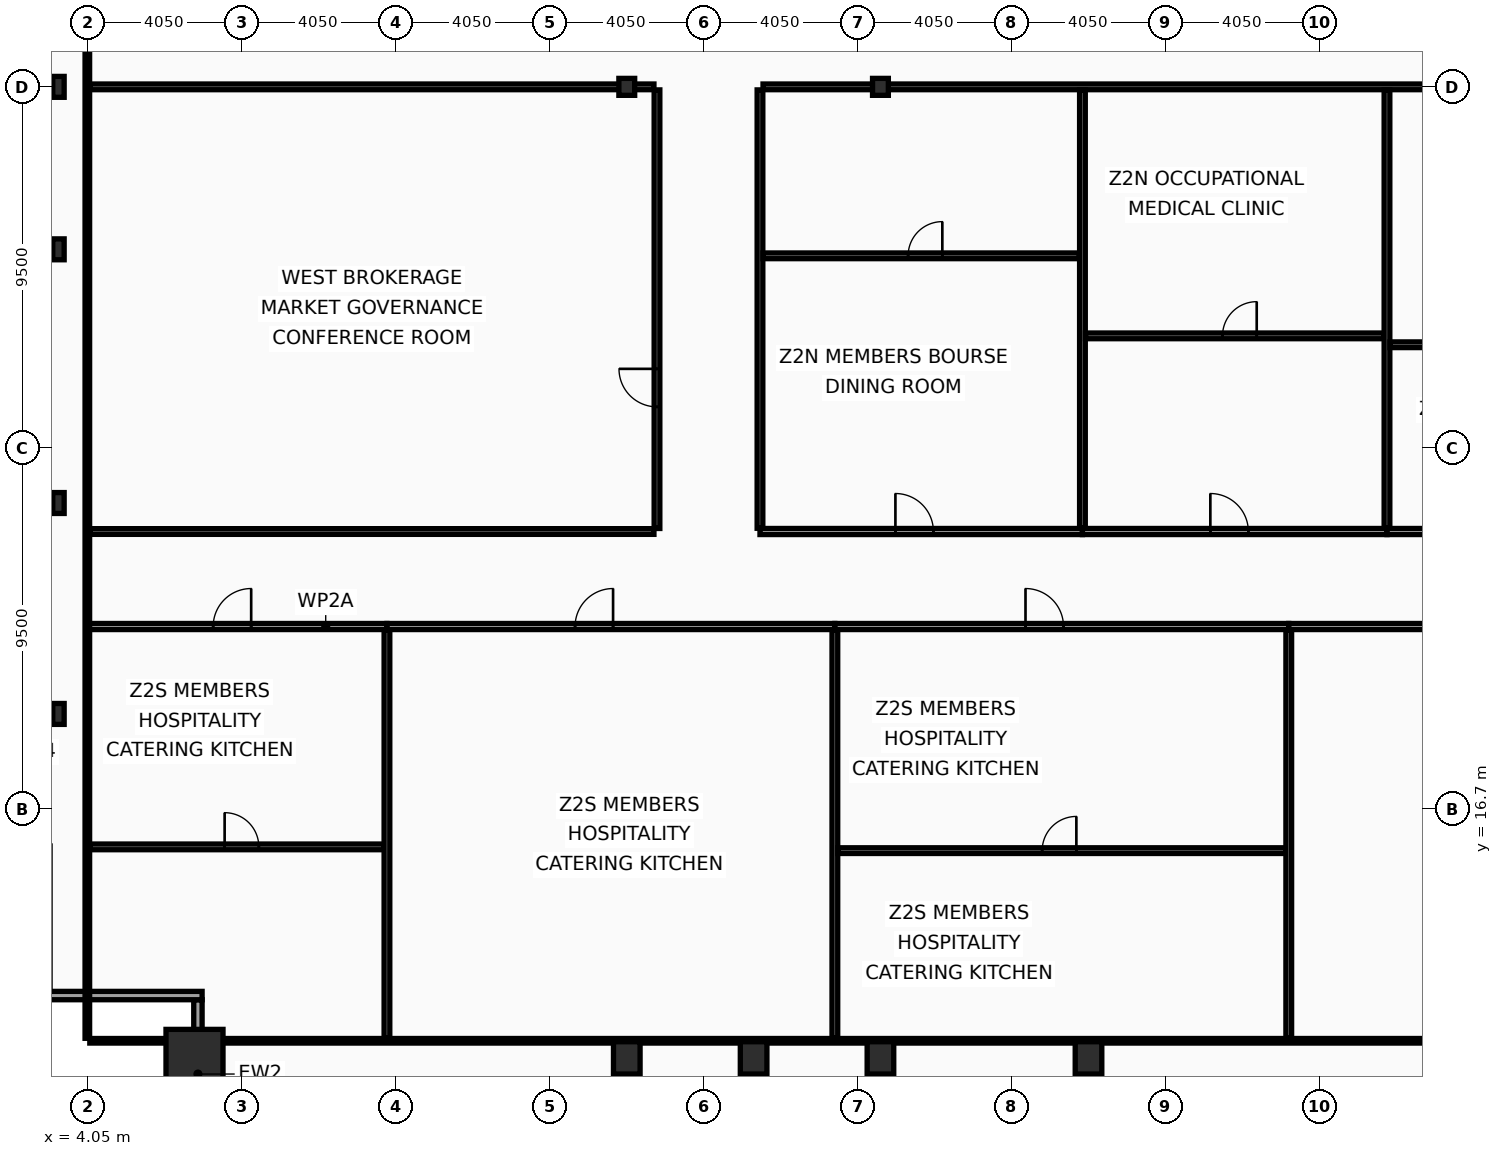
"""IFC4 building model, lengths in metres.
Left out: names, types, materials, properties, quantities, classifications, styles, units other than length and angle.
Written with IfcOpenShell. Run it as: python <this file> out.ifc"""

import sys

from ifc_helpers import new_model, si_unit, direction, frame, frame_2d, origin, origin_2d, place, context, subcontext, project, spatial, rectangle, hollow_rectangle, i_section, extrude, element, fill, save


model = new_model("IFC4")
c1 = context("Model", 3, precision=1e-05, world=origin(), true_north=direction((0.0, 1.0)))
c2 = subcontext(c1, "Body", "Model", "MODEL_VIEW")
j1 = project(units=[si_unit("LENGTHUNIT", "METRE"), si_unit("PLANEANGLEUNIT", "RADIAN")], contexts=[c1])
p1 = place(None, origin())
s1 = spatial("IfcSite", under=j1, at=p1, CompositionType="ELEMENT")
p2 = place(p1, origin())
s2 = spatial("IfcBuilding", under=s1, at=p2, CompositionType="ELEMENT")
p3 = place(p2, frame((0.0, 0.0, 125.4)))
s3 = spatial("IfcBuildingStorey", under=s2, at=p3, CompositionType="ELEMENT", Elevation=125.4)
p4 = place(p3, frame((6.85, 10.15, 0.0), z_axis=(0.0, 0.0, 1.0), x_axis=(1.0, 0.0, 0.0)))
e1 = element("IfcColumn", 1, at=p4, inside=s3, PredefinedType="COLUMN", context=c2, shape_type="SweptSolid", body=[
    extrude(hollow_rectangle(XDim=1.5, YDim=1.5, WallThickness=0.07, at=origin_2d()), origin(), (0.0, 0.0, 1.0), 3.6),
])
for number, where, z_axis, x_axis in (
    (2, (18.225, 10.15, 0.0), (0.0, 0.0, 1.0), (1.0, 0.0, 0.0)),
    (3, (21.562, 10.15, 0.0), (0.0, 0.0, 1.0), (1.0, 0.0, 0.0)),
    (4, (24.9, 10.15, 0.0), (0.0, 0.0, 1.0), (1.0, 0.0, 0.0)),
    (5, (30.375, 10.15, 0.0), (0.0, 0.0, 1.0), (1.0, 0.0, 0.0)),
):
    element("IfcColumn", number, at=place(p3, frame(where, z_axis=z_axis, x_axis=x_axis)), inside=s3, PredefinedType="COLUMN", context=c2, shape_type="SweptSolid", body=[
        extrude(hollow_rectangle(XDim=0.7, YDim=0.85, WallThickness=0.05, at=origin_2d()), origin(), (0.0, 0.0, 1.0), 3.6),
    ])
for number, where, z_axis, x_axis in (
    (6, (3.27, 19.2, 0.0), (0.0, 0.0, 1.0), (1.0, 0.0, 0.0)),
    (7, (3.27, 24.75, 0.0), (0.0, 0.0, 1.0), (1.0, 0.0, 0.0)),
    (8, (3.27, 31.425, 0.0), (0.0, 0.0, 1.0), (1.0, 0.0, 0.0)),
    (9, (3.27, 35.7, 0.0), (0.0, 0.0, 1.0), (1.0, 0.0, 0.0)),
):
    element("IfcColumn", number, at=place(p3, frame(where, z_axis=z_axis, x_axis=x_axis)), inside=s3, PredefinedType="COLUMN", context=c2, shape_type="SweptSolid", body=[
        extrude(i_section(OverallWidth=0.3, OverallDepth=0.55, WebThickness=0.015, FlangeThickness=0.029, at=origin_2d()), origin(), (0.0, 0.0, 1.0), 3.6),
    ])
for number, where, z_axis, x_axis in (
    (10, (18.225, 35.7, 0.0), (0.0, 0.0, 1.0), (1.0, 0.0, 0.0)),
    (11, (24.9, 35.7, 0.0), (0.0, 0.0, 1.0), (1.0, 0.0, 0.0)),
):
    element("IfcColumn", number, at=place(p3, frame(where, z_axis=z_axis, x_axis=x_axis)), inside=s3, PredefinedType="COLUMN", context=c2, shape_type="SweptSolid", body=[
        extrude(i_section(OverallWidth=0.416, OverallDepth=0.446, WebThickness=0.039, FlangeThickness=0.063, at=origin_2d()), origin(), (0.0, 0.0, 1.0), 3.6),
    ])
p5 = place(p3, frame((6.94, 7.77, 0.0), z_axis=(0.0, 0.0, 1.0), x_axis=(0.0, 1.0, 0.0)))
e12 = element("IfcWall", 12, at=p5, inside=s3, PredefinedType="SOLIDWALL", context=c2, shape_type="SweptSolid", body=[
    extrude(rectangle(XDim=3.91, YDim=0.22, at=frame_2d((1.955, 0.0))), origin(), (0.0, 0.0, 1.0), 2.83),
])
p6 = place(p3, frame((7.05, 11.79, 0.0), z_axis=(0.0, 0.0, 1.0), x_axis=(-1.0, 0.0, 0.0)))
e13 = element("IfcWall", 13, at=p6, inside=s3, PredefinedType="SOLIDWALL", context=c2, shape_type="SweptSolid", body=[
    extrude(rectangle(XDim=4.22, YDim=0.22, at=frame_2d((2.11, 0.0))), origin(), (0.0, 0.0, 1.0), 2.83),
])
p7 = place(p3, frame((4.03, 21.5, 0.0), z_axis=(0.0, 0.0, 1.0), x_axis=(1.0, 0.0, 0.0)))
e14 = element("IfcWall", 14, at=p7, inside=s3, PredefinedType="PARTITIONING", context=c2, shape_type="SweptSolid", body=[
    extrude(rectangle(XDim=7.884, YDim=0.16, at=frame_2d((3.942, 0.0))), origin(), (0.0, 0.0, 1.0), 3.44),
])
p8 = place(p7, frame((3.311, 0.0, 0.0)))
e15 = element("IfcOpeningElement", 15, at=p8, cuts=e14, PredefinedType="OPENING", context=c2, shape_type="SweptSolid", body=[
    extrude(rectangle(XDim=1.0, YDim=2.05, at=frame_2d((0.5, 1.025))), frame((0.0, 0.09, 0.0), z_axis=(0.0, -1.0, 0.0), x_axis=(1.0, 0.0, 0.0)), (0.0, 0.0, 1.0), 0.18),
])
p9 = place(p3, frame((4.095, 15.702, 0.0), z_axis=(0.0, 0.0, 1.0), x_axis=(1.0, 0.0, 0.0)))
e16 = element("IfcWall", 16, at=p9, inside=s3, PredefinedType="PARTITIONING", context=c2, shape_type="SweptSolid", body=[
    extrude(rectangle(XDim=7.739, YDim=0.15, at=frame_2d((3.87, 0.0))), origin(), (0.0, 0.0, 1.0), 2.83),
])
p10 = place(p9, frame((3.548, 0.0, 0.0)))
e17 = element("IfcOpeningElement", 17, at=p10, cuts=e16, PredefinedType="OPENING", context=c2, shape_type="SweptSolid", body=[
    extrude(rectangle(XDim=0.9, YDim=2.05, at=frame_2d((0.45, 1.025))), frame((0.0, 0.085, 0.0), z_axis=(0.0, -1.0, 0.0), x_axis=(1.0, 0.0, 0.0)), (0.0, 0.0, 1.0), 0.17),
])
p11 = place(p3, frame((11.914, 21.5, 0.0), z_axis=(0.0, 0.0, 1.0), x_axis=(1.0, 0.0, 0.0)))
e18 = element("IfcWall", 18, at=p11, inside=s3, PredefinedType="PARTITIONING", context=c2, shape_type="SweptSolid", body=[
    extrude(rectangle(XDim=11.787, YDim=0.16, at=frame_2d((5.893, 0.0))), origin(), (0.0, 0.0, 1.0), 2.73),
])
p12 = place(p11, frame((4.95, 0.0, 0.0)))
e19 = element("IfcOpeningElement", 19, at=p12, cuts=e18, PredefinedType="OPENING", context=c2, shape_type="SweptSolid", body=[
    extrude(rectangle(XDim=1.0, YDim=2.05, at=frame_2d((0.5, 1.025))), frame((0.0, 0.09, 0.0), z_axis=(0.0, -1.0, 0.0), x_axis=(1.0, 0.0, 0.0)), (0.0, 0.0, 1.0), 0.18),
])
p13 = place(p3, frame((11.914, 10.665, 0.0), z_axis=(0.0, 0.0, 1.0), x_axis=(0.0, 1.0, 0.0)))
e20 = element("IfcWall", 20, at=p13, inside=s3, PredefinedType="PARTITIONING", context=c2, shape_type="SweptSolid", body=[
    extrude(rectangle(XDim=10.75, YDim=0.15, at=frame_2d((5.375, 0.0))), origin(), (0.0, 0.0, 1.0), 2.73),
])
p14 = place(p3, frame((23.701, 21.5, 0.0), z_axis=(0.0, 0.0, 1.0), x_axis=(1.0, 0.0, 0.0)))
e21 = element("IfcWall", 21, at=p14, inside=s3, PredefinedType="PARTITIONING", context=c2, shape_type="SweptSolid", body=[
    extrude(rectangle(XDim=11.944, YDim=0.16, at=frame_2d((5.972, 0.0))), origin(), (0.0, 0.0, 1.0), 2.73),
])
p15 = place(p14, frame((5.016, 0.0, 0.0)))
e22 = element("IfcOpeningElement", 22, at=p15, cuts=e21, PredefinedType="OPENING", context=c2, shape_type="SweptSolid", body=[
    extrude(rectangle(XDim=1.0, YDim=2.05, at=frame_2d((0.5, 1.025))), frame((0.0, 0.09, 0.0), z_axis=(0.0, -1.0, 0.0), x_axis=(1.0, 0.0, 0.0)), (0.0, 0.0, 1.0), 0.18),
])
p16 = place(p3, frame((23.701, 10.665, 0.0), z_axis=(0.0, 0.0, 1.0), x_axis=(0.0, 1.0, 0.0)))
e23 = element("IfcWall", 23, at=p16, inside=s3, PredefinedType="PARTITIONING", context=c2, shape_type="SweptSolid", body=[
    extrude(rectangle(XDim=10.75, YDim=0.15, at=frame_2d((5.375, 0.0))), origin(), (0.0, 0.0, 1.0), 2.88),
])
p17 = place(p3, frame((23.781, 15.603, 0.0), z_axis=(0.0, 0.0, 1.0), x_axis=(1.0, 0.0, 0.0)))
e24 = element("IfcWall", 24, at=p17, inside=s3, PredefinedType="PARTITIONING", context=c2, shape_type="SweptSolid", body=[
    extrude(rectangle(XDim=11.784, YDim=0.15, at=frame_2d((5.892, 0.0))), origin(), (0.0, 0.0, 1.0), 2.73),
])
p18 = place(p17, frame((5.375, 0.0, 0.0)))
e25 = element("IfcOpeningElement", 25, at=p18, cuts=e24, PredefinedType="OPENING", context=c2, shape_type="SweptSolid", body=[
    extrude(rectangle(XDim=0.9, YDim=2.05, at=frame_2d((0.45, 1.025))), frame((0.0, 0.085, 0.0), z_axis=(0.0, -1.0, 0.0), x_axis=(1.0, 0.0, 0.0)), (0.0, 0.0, 1.0), 0.17),
])
p19 = place(p3, frame((35.645, 21.5, 0.0), z_axis=(0.0, 0.0, 1.0), x_axis=(1.0, 0.0, 0.0)))
e26 = element("IfcWall", 26, at=p19, inside=s3, PredefinedType="PARTITIONING", context=c2, shape_type="SweptSolid", body=[
    extrude(rectangle(XDim=16.763, YDim=0.16, at=frame_2d((8.382, 0.0))), origin(), (0.0, 0.0, 1.0), 2.73),
])
p20 = place(p19, frame((7.041, 0.0, 0.0)))
e27 = element("IfcOpeningElement", 27, at=p20, cuts=e26, PredefinedType="OPENING", context=c2, shape_type="SweptSolid", body=[
    extrude(rectangle(XDim=1.6, YDim=2.15, at=frame_2d((0.8, 1.075))), frame((0.0, 0.09, 0.0), z_axis=(0.0, -1.0, 0.0), x_axis=(1.0, 0.0, 0.0)), (0.0, 0.0, 1.0), 0.18),
])
p21 = place(p3, frame((35.645, 10.665, 0.0), z_axis=(0.0, 0.0, 1.0), x_axis=(0.0, 1.0, 0.0)))
e28 = element("IfcWall", 28, at=p21, inside=s3, PredefinedType="PARTITIONING", context=c2, shape_type="SweptSolid", body=[
    extrude(rectangle(XDim=10.75, YDim=0.15, at=frame_2d((5.375, 0.0))), origin(), (0.0, 0.0, 1.0), 2.88),
])
p22 = place(p3, frame((19.02, 24.08, 0.0), z_axis=(0.0, 0.0, 1.0), x_axis=(0.0, 1.0, 0.0)))
e29 = element("IfcWall", 29, at=p22, inside=s3, PredefinedType="PARTITIONING", context=c2, shape_type="SweptSolid", body=[
    extrude(rectangle(XDim=11.54, YDim=0.15, at=frame_2d((5.77, 0.0))), origin(), (0.0, 0.0, 1.0), 2.88),
])
p23 = place(p22, frame((3.2, 0.0, 0.0)))
e30 = element("IfcOpeningElement", 30, at=p23, cuts=e29, PredefinedType="OPENING", context=c2, shape_type="SweptSolid", body=[
    extrude(rectangle(XDim=1.0, YDim=2.05, at=frame_2d((0.5, 1.025))), frame((0.0, 0.085, 0.0), z_axis=(0.0, -1.0, 0.0), x_axis=(1.0, 0.0, 0.0)), (0.0, 0.0, 1.0), 0.17),
])
for number, where, z_axis, x_axis in (
    (31, (4.095, 24.0, 0.0), (0.0, 0.0, 1.0), (1.0, 0.0, 0.0)),
    (32, (4.095, 35.7, 0.0), (0.0, 0.0, 1.0), (1.0, 0.0, 0.0)),
):
    element("IfcWall", number, at=place(p3, frame(where, z_axis=z_axis, x_axis=x_axis)), inside=s3, PredefinedType="PARTITIONING", context=c2, shape_type="SweptSolid", body=[
        extrude(rectangle(XDim=14.845, YDim=0.15, at=frame_2d((7.422, 0.0))), origin(), (0.0, 0.0, 1.0), 2.73),
    ])
p24 = place(p3, frame((21.73, 24.085, 0.0), z_axis=(0.0, 0.0, 1.0), x_axis=(0.0, 1.0, 0.0)))
e33 = element("IfcWall", 33, at=p24, inside=s3, PredefinedType="PARTITIONING", context=c2, shape_type="SweptSolid", body=[
    extrude(rectangle(XDim=11.535, YDim=0.15, at=frame_2d((5.768, 0.0))), origin(), (0.0, 0.0, 1.0), 2.88),
])
p25 = place(p3, frame((21.81, 35.7, 0.0), z_axis=(0.0, 0.0, 1.0), x_axis=(1.0, 0.0, 0.0)))
e34 = element("IfcWall", 34, at=p25, inside=s3, PredefinedType="PARTITIONING", context=c2, shape_type="SweptSolid", body=[
    extrude(rectangle(XDim=46.995, YDim=0.15, at=frame_2d((23.498, 0.0))), origin(), (0.0, 0.0, 1.0), 2.73),
])
p26 = place(p3, frame((21.73, 24.0, 0.0), z_axis=(0.0, 0.0, 1.0), x_axis=(1.0, 0.0, 0.0)))
e35 = element("IfcWall", 35, at=p26, inside=s3, PredefinedType="PARTITIONING", context=c2, shape_type="SweptSolid", body=[
    extrude(rectangle(XDim=8.485, YDim=0.16, at=frame_2d((4.243, 0.0))), origin(), (0.0, 0.0, 1.0), 2.73),
])
p27 = place(p26, frame((3.564, 0.0, 0.0)))
e36 = element("IfcOpeningElement", 36, at=p27, cuts=e35, PredefinedType="OPENING", context=c2, shape_type="SweptSolid", body=[
    extrude(rectangle(XDim=1.0, YDim=2.05, at=frame_2d((0.5, 1.025))), frame((0.0, 0.09, 0.0), z_axis=(0.0, -1.0, 0.0), x_axis=(1.0, 0.0, 0.0)), (0.0, 0.0, 1.0), 0.18),
])
p28 = place(p3, frame((21.81, 31.254, 0.0), z_axis=(0.0, 0.0, 1.0), x_axis=(1.0, 0.0, 0.0)))
e37 = element("IfcWall", 37, at=p28, inside=s3, PredefinedType="PARTITIONING", context=c2, shape_type="SweptSolid", body=[
    extrude(rectangle(XDim=8.325, YDim=0.15, at=frame_2d((4.163, 0.0))), origin(), (0.0, 0.0, 1.0), 2.73),
])
p29 = place(p28, frame((3.818, 0.0, 0.0)))
e38 = element("IfcOpeningElement", 38, at=p29, cuts=e37, PredefinedType="OPENING", context=c2, shape_type="SweptSolid", body=[
    extrude(rectangle(XDim=0.9, YDim=2.05, at=frame_2d((0.45, 1.025))), frame((0.0, 0.085, 0.0), z_axis=(0.0, -1.0, 0.0), x_axis=(1.0, 0.0, 0.0)), (0.0, 0.0, 1.0), 0.17),
])
p30 = place(p3, frame((30.215, 24.0, 0.0), z_axis=(0.0, 0.0, 1.0), x_axis=(1.0, 0.0, 0.0)))
e39 = element("IfcWall", 39, at=p30, inside=s3, PredefinedType="PARTITIONING", context=c2, shape_type="SweptSolid", body=[
    extrude(rectangle(XDim=8.014, YDim=0.16, at=frame_2d((4.007, 0.0))), origin(), (0.0, 0.0, 1.0), 2.73),
])
p31 = place(p30, frame((3.366, 0.0, 0.0)))
e40 = element("IfcOpeningElement", 40, at=p31, cuts=e39, PredefinedType="OPENING", context=c2, shape_type="SweptSolid", body=[
    extrude(rectangle(XDim=1.0, YDim=2.05, at=frame_2d((0.5, 1.025))), frame((0.0, 0.09, 0.0), z_axis=(0.0, -1.0, 0.0), x_axis=(1.0, 0.0, 0.0)), (0.0, 0.0, 1.0), 0.18),
])
p32 = place(p3, frame((30.215, 24.085, 0.0), z_axis=(0.0, 0.0, 1.0), x_axis=(0.0, 1.0, 0.0)))
e41 = element("IfcWall", 41, at=p32, inside=s3, PredefinedType="PARTITIONING", context=c2, shape_type="SweptSolid", body=[
    extrude(rectangle(XDim=11.535, YDim=0.15, at=frame_2d((5.768, 0.0))), origin(), (0.0, 0.0, 1.0), 2.73),
])
p33 = place(p3, frame((30.295, 29.148, 0.0), z_axis=(0.0, 0.0, 1.0), x_axis=(1.0, 0.0, 0.0)))
e42 = element("IfcWall", 42, at=p33, inside=s3, PredefinedType="PARTITIONING", context=c2, shape_type="SweptSolid", body=[
    extrude(rectangle(XDim=7.854, YDim=0.15, at=frame_2d((3.927, 0.0))), origin(), (0.0, 0.0, 1.0), 2.73),
])
p34 = place(p33, frame((3.606, 0.0, 0.0)))
e43 = element("IfcOpeningElement", 43, at=p34, cuts=e42, PredefinedType="OPENING", context=c2, shape_type="SweptSolid", body=[
    extrude(rectangle(XDim=0.9, YDim=2.05, at=frame_2d((0.45, 1.025))), frame((0.0, 0.085, 0.0), z_axis=(0.0, -1.0, 0.0), x_axis=(1.0, 0.0, 0.0)), (0.0, 0.0, 1.0), 0.17),
])
p35 = place(p3, frame((38.229, 24.0, 0.0), z_axis=(0.0, 0.0, 1.0), x_axis=(1.0, 0.0, 0.0)))
e44 = element("IfcWall", 44, at=p35, inside=s3, PredefinedType="PARTITIONING", context=c2, shape_type="SweptSolid", body=[
    extrude(rectangle(XDim=14.613, YDim=0.16, at=frame_2d((7.307, 0.0))), origin(), (0.0, 0.0, 1.0), 2.73),
])
p36 = place(p35, frame((6.138, 0.0, 0.0)))
e45 = element("IfcOpeningElement", 45, at=p36, cuts=e44, PredefinedType="OPENING", context=c2, shape_type="SweptSolid", body=[
    extrude(rectangle(XDim=1.6, YDim=2.15, at=frame_2d((0.8, 1.075))), frame((0.0, 0.09, 0.0), z_axis=(0.0, -1.0, 0.0), x_axis=(1.0, 0.0, 0.0)), (0.0, 0.0, 1.0), 0.18),
])
p37 = place(p3, frame((38.229, 24.085, 0.0), z_axis=(0.0, 0.0, 1.0), x_axis=(0.0, 1.0, 0.0)))
e46 = element("IfcWall", 46, at=p37, inside=s3, PredefinedType="PARTITIONING", context=c2, shape_type="SweptSolid", body=[
    extrude(rectangle(XDim=11.535, YDim=0.15, at=frame_2d((5.768, 0.0))), origin(), (0.0, 0.0, 1.0), 2.88),
])
p38 = place(p3, frame((38.309, 28.914, 0.0), z_axis=(0.0, 0.0, 1.0), x_axis=(1.0, 0.0, 0.0)))
e47 = element("IfcWall", 47, at=p38, inside=s3, PredefinedType="PARTITIONING", context=c2, shape_type="SweptSolid", body=[
    extrude(rectangle(XDim=14.453, YDim=0.15, at=frame_2d((7.227, 0.0))), origin(), (0.0, 0.0, 1.0), 2.73),
])
p39 = place(p38, frame((6.576, 0.0, 0.0)))
e48 = element("IfcOpeningElement", 48, at=p39, cuts=e47, PredefinedType="OPENING", context=c2, shape_type="SweptSolid", body=[
    extrude(rectangle(XDim=0.9, YDim=2.05, at=frame_2d((0.45, 1.025))), frame((0.0, 0.085, 0.0), z_axis=(0.0, -1.0, 0.0), x_axis=(1.0, 0.0, 0.0)), (0.0, 0.0, 1.0), 0.17),
])
p40 = place(p3, frame((4.03, 10.665, 0.0), z_axis=(0.0, 0.0, 1.0), x_axis=(0.0, 1.0, 0.0)))
e49 = element("IfcWall", 49, at=p40, inside=s3, PredefinedType="PARTITIONING", context=c2, shape_type="SweptSolid", body=[
    extrude(rectangle(XDim=42.11, YDim=0.12, at=frame_2d((21.055, 0.0))), origin(), (0.0, 0.0, 1.0), 2.73),
])
p41 = place(p3, frame((4.095, 10.6, 0.0), z_axis=(0.0, 0.0, 1.0), x_axis=(1.0, 0.0, 0.0)))
e50 = element("IfcWall", 50, at=p41, inside=s3, PredefinedType="PARTITIONING", context=c2, shape_type="SweptSolid", body=[
    extrude(rectangle(XDim=64.71, YDim=0.12, at=frame_2d((32.355, 0.0))), origin(), (0.0, 0.0, 1.0), 2.73),
])
p42 = place(p8, origin())
e51 = element("IfcDoor", 51, at=p42, inside=s3, OperationType="SINGLE_SWING_RIGHT", PredefinedType="DOOR", context=c2, shape_type="SweptSolid", body=[
    extrude(rectangle(XDim=1.0, YDim=2.05, at=frame_2d((0.5, 1.025))), frame((0.0, 0.025, 0.0), z_axis=(0.0, -1.0, 0.0), x_axis=(1.0, 0.0, 0.0)), (0.0, 0.0, 1.0), 0.05),
])
fill(e15, e51)
p43 = place(p10, origin())
e52 = element("IfcDoor", 52, at=p43, inside=s3, OperationType="SINGLE_SWING_LEFT", PredefinedType="DOOR", context=c2, shape_type="SweptSolid", body=[
    extrude(rectangle(XDim=0.9, YDim=2.05, at=frame_2d((0.45, 1.025))), frame((0.0, 0.025, 0.0), z_axis=(0.0, -1.0, 0.0), x_axis=(1.0, 0.0, 0.0)), (0.0, 0.0, 1.0), 0.05),
])
fill(e17, e52)
p44 = place(p12, origin())
e53 = element("IfcDoor", 53, at=p44, inside=s3, OperationType="SINGLE_SWING_RIGHT", PredefinedType="DOOR", context=c2, shape_type="SweptSolid", body=[
    extrude(rectangle(XDim=1.0, YDim=2.05, at=frame_2d((0.5, 1.025))), frame((0.0, 0.025, 0.0), z_axis=(0.0, -1.0, 0.0), x_axis=(1.0, 0.0, 0.0)), (0.0, 0.0, 1.0), 0.05),
])
fill(e19, e53)
p45 = place(p15, origin())
e54 = element("IfcDoor", 54, at=p45, inside=s3, OperationType="SINGLE_SWING_LEFT", PredefinedType="DOOR", context=c2, shape_type="SweptSolid", body=[
    extrude(rectangle(XDim=1.0, YDim=2.05, at=frame_2d((0.5, 1.025))), frame((0.0, 0.025, 0.0), z_axis=(0.0, -1.0, 0.0), x_axis=(1.0, 0.0, 0.0)), (0.0, 0.0, 1.0), 0.05),
])
fill(e22, e54)
p46 = place(p18, origin())
e55 = element("IfcDoor", 55, at=p46, inside=s3, OperationType="SINGLE_SWING_RIGHT", PredefinedType="DOOR", context=c2, shape_type="SweptSolid", body=[
    extrude(rectangle(XDim=0.9, YDim=2.05, at=frame_2d((0.45, 1.025))), frame((0.0, 0.025, 0.0), z_axis=(0.0, -1.0, 0.0), x_axis=(1.0, 0.0, 0.0)), (0.0, 0.0, 1.0), 0.05),
])
fill(e25, e55)
p47 = place(p23, origin())
e56 = element("IfcDoor", 56, at=p47, inside=s3, OperationType="SINGLE_SWING_RIGHT", PredefinedType="DOOR", context=c2, shape_type="SweptSolid", body=[
    extrude(rectangle(XDim=1.0, YDim=2.05, at=frame_2d((0.5, 1.025))), frame((0.0, 0.025, 0.0), z_axis=(0.0, -1.0, 0.0), x_axis=(1.0, 0.0, 0.0)), (0.0, 0.0, 1.0), 0.05),
])
fill(e30, e56)
p48 = place(p27, origin())
e57 = element("IfcDoor", 57, at=p48, inside=s3, OperationType="SINGLE_SWING_LEFT", PredefinedType="DOOR", context=c2, shape_type="SweptSolid", body=[
    extrude(rectangle(XDim=1.0, YDim=2.05, at=frame_2d((0.5, 1.025))), frame((0.0, 0.025, 0.0), z_axis=(0.0, -1.0, 0.0), x_axis=(1.0, 0.0, 0.0)), (0.0, 0.0, 1.0), 0.05),
])
fill(e36, e57)
p49 = place(p29, origin())
e58 = element("IfcDoor", 58, at=p49, inside=s3, OperationType="SINGLE_SWING_RIGHT", PredefinedType="DOOR", context=c2, shape_type="SweptSolid", body=[
    extrude(rectangle(XDim=0.9, YDim=2.05, at=frame_2d((0.45, 1.025))), frame((0.0, 0.025, 0.0), z_axis=(0.0, -1.0, 0.0), x_axis=(1.0, 0.0, 0.0)), (0.0, 0.0, 1.0), 0.05),
])
fill(e38, e58)
p50 = place(p31, origin())
e59 = element("IfcDoor", 59, at=p50, inside=s3, OperationType="SINGLE_SWING_LEFT", PredefinedType="DOOR", context=c2, shape_type="SweptSolid", body=[
    extrude(rectangle(XDim=1.0, YDim=2.05, at=frame_2d((0.5, 1.025))), frame((0.0, 0.025, 0.0), z_axis=(0.0, -1.0, 0.0), x_axis=(1.0, 0.0, 0.0)), (0.0, 0.0, 1.0), 0.05),
])
fill(e40, e59)
p51 = place(p34, origin())
e60 = element("IfcDoor", 60, at=p51, inside=s3, OperationType="SINGLE_SWING_RIGHT", PredefinedType="DOOR", context=c2, shape_type="SweptSolid", body=[
    extrude(rectangle(XDim=0.9, YDim=2.05, at=frame_2d((0.45, 1.025))), frame((0.0, 0.025, 0.0), z_axis=(0.0, -1.0, 0.0), x_axis=(1.0, 0.0, 0.0)), (0.0, 0.0, 1.0), 0.05),
])
fill(e43, e60)
save(model, sys.argv[1])
